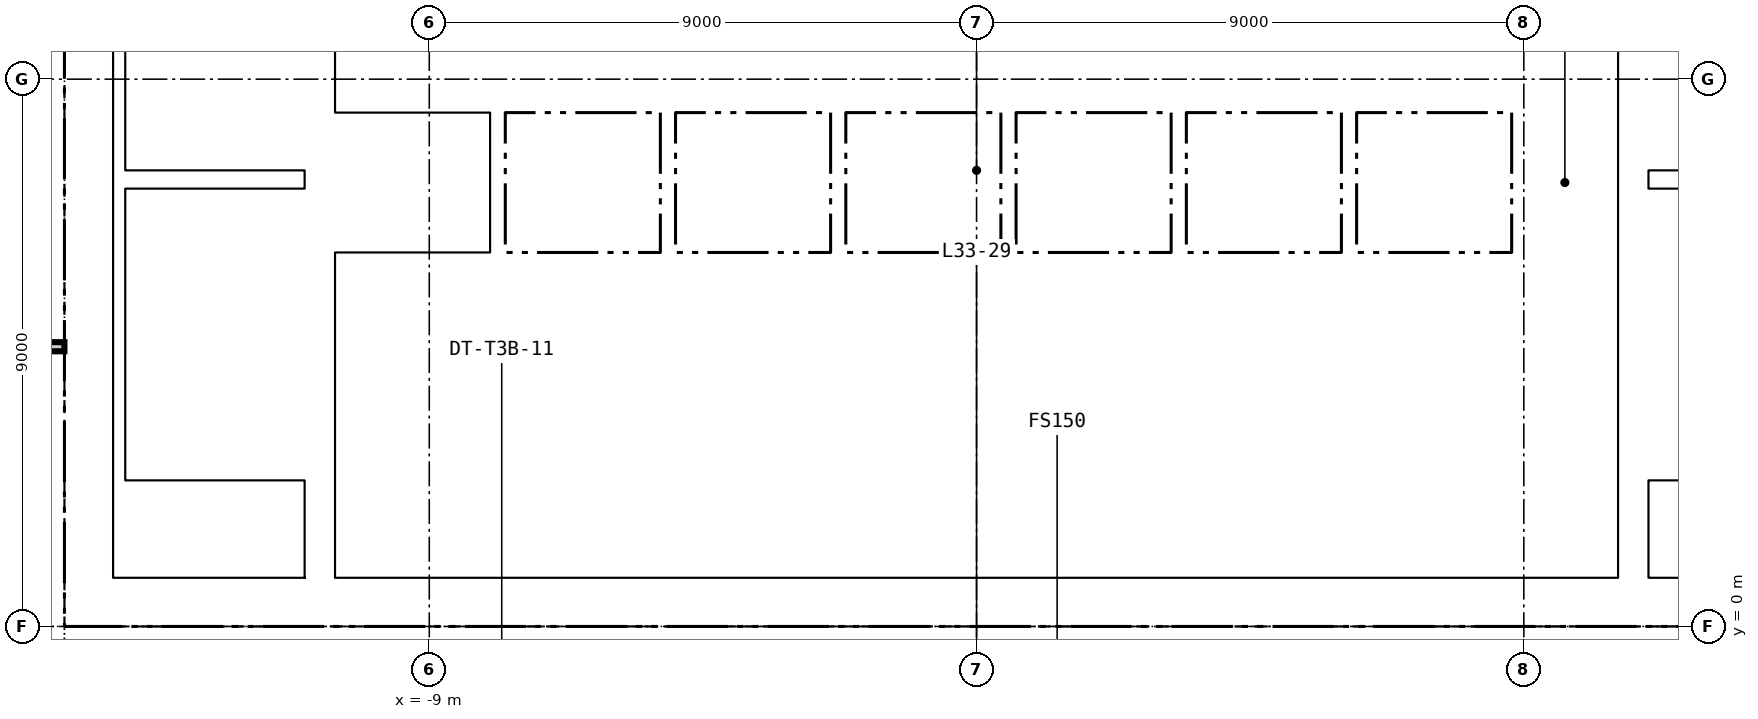
"""IFC4 building model, lengths in metres.
Left out: names, types, materials, properties, quantities, classifications, styles, units other than length and angle.
Written with IfcOpenShell. Run it as: python <this file> out.ifc"""

import sys

from ifc_helpers import new_model, si_unit, direction, frame, frame_2d, origin, place, context, subcontext, project, spatial, rectangle, extrude, element, fill, save


model = new_model("IFC4")
c1 = context("Model", 3, precision=1e-05, world=origin(), true_north=direction((0.0, 1.0)))
c2 = subcontext(c1, "Body", "Model", "MODEL_VIEW")
j1 = project(units=[si_unit("LENGTHUNIT", "METRE"), si_unit("PLANEANGLEUNIT", "RADIAN")], contexts=[c1])
p1 = place(None, origin())
s1 = spatial("IfcSite", under=j1, at=p1, CompositionType="ELEMENT")
p2 = place(p1, origin())
s2 = spatial("IfcBuilding", under=s1, at=p2, CompositionType="ELEMENT")
p3 = place(p2, frame((0.0, 0.0, 137.1)))
s3 = spatial("IfcBuildingStorey", under=s2, at=p3, CompositionType="ELEMENT", Elevation=137.1)
p4 = place(p3, frame((-15.0, 0.4, -0.15), z_axis=(0.0, 0.0, 1.0), x_axis=(1.0, 0.0, 0.0)))
e1 = element("IfcWall", 1, at=p4, inside=s3, PredefinedType="SOLIDWALL", context=c2, shape_type="SweptSolid", body=[
    extrude(rectangle(XDim=30.0, YDim=0.8, at=frame_2d((15.0, 0.0))), origin(), (0.0, 0.0, 1.0), 3.65),
])
p5 = place(p4, frame((5.8, 0.0, 0.15)))
e2 = element("IfcOpeningElement", 2, at=p5, cuts=e1, PredefinedType="OPENING", context=c2, shape_type="SweptSolid", body=[
    extrude(rectangle(XDim=2.4, YDim=2.4, at=frame_2d((1.2, 1.2))), frame((0.0, 0.41, 0.0), z_axis=(0.0, -1.0, 0.0), x_axis=(1.0, 0.0, 0.0)), (0.0, 0.0, 1.0), 0.82),
])
p6 = place(p4, frame((13.8, 0.0, 0.15)))
e3 = element("IfcOpeningElement", 3, at=p6, cuts=e1, PredefinedType="OPENING", context=c2, shape_type="SweptSolid", body=[
    extrude(rectangle(XDim=2.4, YDim=2.4, at=frame_2d((1.2, 1.2))), frame((0.0, 0.41, 0.0), z_axis=(0.0, -1.0, 0.0), x_axis=(1.0, 0.0, 0.0)), (0.0, 0.0, 1.0), 0.82),
])
p7 = place(p4, frame((21.8, 0.0, 0.15)))
e4 = element("IfcOpeningElement", 4, at=p7, cuts=e1, PredefinedType="OPENING", context=c2, shape_type="SweptSolid", body=[
    extrude(rectangle(XDim=2.4, YDim=2.4, at=frame_2d((1.2, 1.2))), frame((0.0, 0.41, 0.0), z_axis=(0.0, -1.0, 0.0), x_axis=(1.0, 0.0, 0.0)), (0.0, 0.0, 1.0), 0.82),
])
p8 = place(p4, frame((1.5, 0.0, 0.15)))
e5 = element("IfcOpeningElement", 5, at=p8, cuts=e1, PredefinedType="OPENING", context=c2, shape_type="SweptSolid", body=[
    extrude(rectangle(XDim=1.2, YDim=2.1, at=frame_2d((0.6, 1.05))), frame((0.0, 0.41, 0.0), z_axis=(0.0, -1.0, 0.0), x_axis=(1.0, 0.0, 0.0)), (0.0, 0.0, 1.0), 0.82),
])
p9 = place(p4, frame((27.3, 0.0, 0.15)))
e6 = element("IfcOpeningElement", 6, at=p9, cuts=e1, PredefinedType="OPENING", context=c2, shape_type="SweptSolid", body=[
    extrude(rectangle(XDim=1.2, YDim=2.1, at=frame_2d((0.6, 1.05))), frame((0.0, 0.41, 0.0), z_axis=(0.0, -1.0, 0.0), x_axis=(1.0, 0.0, 0.0)), (0.0, 0.0, 1.0), 0.82),
])
p10 = place(p3, frame((-14.6, 0.8, -0.15), z_axis=(0.0, 0.0, 1.0), x_axis=(0.0, 1.0, 0.0)))
e7 = element("IfcWall", 7, at=p10, inside=s3, PredefinedType="SOLIDWALL", context=c2, shape_type="SweptSolid", body=[
    extrude(rectangle(XDim=13.4, YDim=0.8, at=frame_2d((6.7, 0.0))), origin(), (0.0, 0.0, 1.0), 3.65),
])
for number, where, z_axis, x_axis in (
    (8, (-10.8, 0.8, -0.15), (0.0, 0.0, 1.0), (0.0, 1.0, 0.0)),
    (9, (10.8, 0.8, -0.15), (0.0, 0.0, 1.0), (0.0, 1.0, 0.0)),
):
    element("IfcWall", number, at=place(p3, frame(where, z_axis=z_axis, x_axis=x_axis)), inside=s3, PredefinedType="SOLIDWALL", context=c2, shape_type="SweptSolid", body=[
        extrude(rectangle(XDim=13.4, YDim=0.5, at=frame_2d((6.7, 0.0))), origin(), (0.0, 0.0, 1.0), 3.65),
    ])
p11 = place(p3, frame((-10.55, 3.5, 0.0), z_axis=(0.0, 0.0, 1.0), x_axis=(1.0, 0.0, 0.0)))
e10 = element("IfcWall", 10, at=p11, inside=s3, PredefinedType="PARTITIONING", context=c2, shape_type="SweptSolid", body=[
    extrude(rectangle(XDim=21.1, YDim=0.2, at=frame_2d((10.55, 0.0))), origin(), (0.0, 0.0, 1.0), 3.5),
])
p12 = place(p11, frame((0.663, 0.0, 0.0)))
e11 = element("IfcOpeningElement", 11, at=p12, cuts=e10, PredefinedType="OPENING", context=c2, shape_type="SweptSolid", body=[
    extrude(rectangle(XDim=1.0, YDim=2.1, at=frame_2d((0.5, 1.05))), frame((0.0, 0.11, 0.0), z_axis=(0.0, -1.0, 0.0), x_axis=(1.0, 0.0, 0.0)), (0.0, 0.0, 1.0), 0.22),
])
p13 = place(p11, frame((4.3, 0.0, 0.0)))
e12 = element("IfcOpeningElement", 12, at=p13, cuts=e10, PredefinedType="OPENING", context=c2, shape_type="SweptSolid", body=[
    extrude(rectangle(XDim=1.0, YDim=2.1, at=frame_2d((0.5, 1.05))), frame((0.0, 0.11, 0.0), z_axis=(0.0, -1.0, 0.0), x_axis=(1.0, 0.0, 0.0)), (0.0, 0.0, 1.0), 0.22),
])
p14 = place(p11, frame((9.1, 0.0, 0.0)))
e13 = element("IfcOpeningElement", 13, at=p14, cuts=e10, PredefinedType="OPENING", context=c2, shape_type="SweptSolid", body=[
    extrude(rectangle(XDim=1.0, YDim=2.1, at=frame_2d((0.5, 1.05))), frame((0.0, 0.11, 0.0), z_axis=(0.0, -1.0, 0.0), x_axis=(1.0, 0.0, 0.0)), (0.0, 0.0, 1.0), 0.22),
])
p15 = place(p11, frame((13.25, 0.0, 0.0)))
e14 = element("IfcOpeningElement", 14, at=p15, cuts=e10, PredefinedType="OPENING", context=c2, shape_type="SweptSolid", body=[
    extrude(rectangle(XDim=1.0, YDim=2.1, at=frame_2d((0.5, 1.05))), frame((0.0, 0.11, 0.0), z_axis=(0.0, -1.0, 0.0), x_axis=(1.0, 0.0, 0.0)), (0.0, 0.0, 1.0), 0.22),
])
p16 = place(p11, frame((16.962, 0.0, 0.0)))
e15 = element("IfcOpeningElement", 15, at=p16, cuts=e10, PredefinedType="OPENING", context=c2, shape_type="SweptSolid", body=[
    extrude(rectangle(XDim=1.0, YDim=2.1, at=frame_2d((0.5, 1.05))), frame((0.0, 0.11, 0.0), z_axis=(0.0, -1.0, 0.0), x_axis=(1.0, 0.0, 0.0)), (0.0, 0.0, 1.0), 0.22),
])
p17 = place(p11, frame((19.9, 0.0, 0.0)))
e16 = element("IfcOpeningElement", 16, at=p17, cuts=e10, PredefinedType="OPENING", context=c2, shape_type="SweptSolid", body=[
    extrude(rectangle(XDim=0.9, YDim=2.1, at=frame_2d((0.45, 1.05))), frame((0.0, 0.11, 0.0), z_axis=(0.0, -1.0, 0.0), x_axis=(1.0, 0.0, 0.0)), (0.0, 0.0, 1.0), 0.22),
])
p18 = place(p3, frame((-10.55, 6.025, 0.0), z_axis=(0.0, 0.0, 1.0), x_axis=(1.0, 0.0, 0.0)))
e17 = element("IfcWall", 17, at=p18, inside=s3, PredefinedType="PARTITIONING", context=c2, shape_type="SweptSolid", body=[
    extrude(rectangle(XDim=21.1, YDim=0.25, at=frame_2d((10.55, 0.0))), origin(), (0.0, 0.0, 1.0), 3.5),
])
p19 = place(p3, frame((-10.55, 8.55, 0.0), z_axis=(0.0, 0.0, 1.0), x_axis=(1.0, 0.0, 0.0)))
e18 = element("IfcWall", 18, at=p19, inside=s3, PredefinedType="PARTITIONING", context=c2, shape_type="SweptSolid", body=[
    extrude(rectangle(XDim=21.1, YDim=0.2, at=frame_2d((10.55, 0.0))), origin(), (0.0, 0.0, 1.0), 3.5),
])
p20 = place(p19, frame((0.675, 0.0, 0.0)))
e19 = element("IfcOpeningElement", 19, at=p20, cuts=e18, PredefinedType="OPENING", context=c2, shape_type="SweptSolid", body=[
    extrude(rectangle(XDim=1.2, YDim=2.1, at=frame_2d((0.6, 1.05))), frame((0.0, 0.11, 0.0), z_axis=(0.0, -1.0, 0.0), x_axis=(1.0, 0.0, 0.0)), (0.0, 0.0, 1.0), 0.22),
])
p21 = place(p19, frame((3.475, 0.0, 0.0)))
e20 = element("IfcOpeningElement", 20, at=p21, cuts=e18, PredefinedType="OPENING", context=c2, shape_type="SweptSolid", body=[
    extrude(rectangle(XDim=1.2, YDim=2.1, at=frame_2d((0.6, 1.05))), frame((0.0, 0.11, 0.0), z_axis=(0.0, -1.0, 0.0), x_axis=(1.0, 0.0, 0.0)), (0.0, 0.0, 1.0), 0.22),
])
p22 = place(p19, frame((6.275, 0.0, 0.0)))
e21 = element("IfcOpeningElement", 21, at=p22, cuts=e18, PredefinedType="OPENING", context=c2, shape_type="SweptSolid", body=[
    extrude(rectangle(XDim=1.2, YDim=2.1, at=frame_2d((0.6, 1.05))), frame((0.0, 0.11, 0.0), z_axis=(0.0, -1.0, 0.0), x_axis=(1.0, 0.0, 0.0)), (0.0, 0.0, 1.0), 0.22),
])
p23 = place(p19, frame((9.075, 0.0, 0.0)))
e22 = element("IfcOpeningElement", 22, at=p23, cuts=e18, PredefinedType="OPENING", context=c2, shape_type="SweptSolid", body=[
    extrude(rectangle(XDim=1.2, YDim=2.1, at=frame_2d((0.6, 1.05))), frame((0.0, 0.11, 0.0), z_axis=(0.0, -1.0, 0.0), x_axis=(1.0, 0.0, 0.0)), (0.0, 0.0, 1.0), 0.22),
])
p24 = place(p19, frame((11.875, 0.0, 0.0)))
e23 = element("IfcOpeningElement", 23, at=p24, cuts=e18, PredefinedType="OPENING", context=c2, shape_type="SweptSolid", body=[
    extrude(rectangle(XDim=1.2, YDim=2.1, at=frame_2d((0.6, 1.05))), frame((0.0, 0.11, 0.0), z_axis=(0.0, -1.0, 0.0), x_axis=(1.0, 0.0, 0.0)), (0.0, 0.0, 1.0), 0.22),
])
p25 = place(p19, frame((14.675, 0.0, 0.0)))
e24 = element("IfcOpeningElement", 24, at=p25, cuts=e18, PredefinedType="OPENING", context=c2, shape_type="SweptSolid", body=[
    extrude(rectangle(XDim=1.2, YDim=2.1, at=frame_2d((0.6, 1.05))), frame((0.0, 0.11, 0.0), z_axis=(0.0, -1.0, 0.0), x_axis=(1.0, 0.0, 0.0)), (0.0, 0.0, 1.0), 0.22),
])
p26 = place(p19, frame((17.475, 0.0, 0.0)))
e25 = element("IfcOpeningElement", 25, at=p26, cuts=e18, PredefinedType="OPENING", context=c2, shape_type="SweptSolid", body=[
    extrude(rectangle(XDim=1.2, YDim=2.1, at=frame_2d((0.6, 1.05))), frame((0.0, 0.11, 0.0), z_axis=(0.0, -1.0, 0.0), x_axis=(1.0, 0.0, 0.0)), (0.0, 0.0, 1.0), 0.22),
])
p27 = place(p19, frame((19.9, 0.0, 0.0)))
e26 = element("IfcOpeningElement", 26, at=p27, cuts=e18, PredefinedType="OPENING", context=c2, shape_type="SweptSolid", body=[
    extrude(rectangle(XDim=0.9, YDim=2.1, at=frame_2d((0.45, 1.05))), frame((0.0, 0.11, 0.0), z_axis=(0.0, -1.0, 0.0), x_axis=(1.0, 0.0, 0.0)), (0.0, 0.0, 1.0), 0.22),
])
p28 = place(p3, frame((-4.125, 8.65, 0.0), z_axis=(0.0, 0.0, 1.0), x_axis=(0.0, 1.0, 0.0)))
e27 = element("IfcWall", 27, at=p28, inside=s3, PredefinedType="PARTITIONING", context=c2, shape_type="SweptSolid", body=[
    extrude(rectangle(XDim=2.45, YDim=0.25, at=frame_2d((1.225, 0.0))), origin(), (0.0, 0.0, 1.0), 3.5),
])
p29 = place(p28, frame((0.625, 0.0, 0.0)))
e28 = element("IfcOpeningElement", 28, at=p29, cuts=e27, PredefinedType="OPENING", context=c2, shape_type="SweptSolid", body=[
    extrude(rectangle(XDim=1.2, YDim=2.1, at=frame_2d((0.6, 1.05))), frame((0.0, 0.135, 0.0), z_axis=(0.0, -1.0, 0.0), x_axis=(1.0, 0.0, 0.0)), (0.0, 0.0, 1.0), 0.27),
])
for number, where, z_axis, x_axis in (
    (29, (-8.15, 3.6, 0.0), (0.0, 0.0, 1.0), (0.0, 1.0, 0.0)),
    (30, (-3.35, 3.6, 0.0), (0.0, 0.0, 1.0), (0.0, 1.0, 0.0)),
    (31, (1.45, 3.6, 0.0), (0.0, 0.0, 1.0), (0.0, 1.0, 0.0)),
    (32, (4.95, 3.6, 0.0), (0.0, 0.0, 1.0), (0.0, 1.0, 0.0)),
):
    element("IfcWall", number, at=place(p3, frame(where, z_axis=z_axis, x_axis=x_axis)), inside=s3, PredefinedType="PARTITIONING", context=c2, shape_type="SweptSolid", body=[
        extrude(rectangle(XDim=2.3, YDim=0.15, at=frame_2d((1.15, 0.0))), origin(), (0.0, 0.0, 1.0), 3.5),
    ])
p30 = place(p3, frame((8.925, 3.6, 0.0), z_axis=(0.0, 0.0, 1.0), x_axis=(0.0, 1.0, 0.0)))
e33 = element("IfcWall", 33, at=p30, inside=s3, PredefinedType="PARTITIONING", context=c2, shape_type="SweptSolid", body=[
    extrude(rectangle(XDim=2.3, YDim=0.25, at=frame_2d((1.15, 0.0))), origin(), (0.0, 0.0, 1.0), 3.5),
])
for number, where, z_axis, x_axis in (
    (34, (-7.875, 6.15, 0.0), (0.0, 0.0, 1.0), (0.0, 1.0, 0.0)),
    (35, (-5.075, 6.15, 0.0), (0.0, 0.0, 1.0), (0.0, 1.0, 0.0)),
    (36, (-2.275, 6.15, 0.0), (0.0, 0.0, 1.0), (0.0, 1.0, 0.0)),
    (37, (0.525, 6.15, 0.0), (0.0, 0.0, 1.0), (0.0, 1.0, 0.0)),
    (38, (3.325, 6.15, 0.0), (0.0, 0.0, 1.0), (0.0, 1.0, 0.0)),
    (39, (6.125, 6.15, 0.0), (0.0, 0.0, 1.0), (0.0, 1.0, 0.0)),
    (40, (8.925, 6.15, 0.0), (0.0, 0.0, 1.0), (0.0, 1.0, 0.0)),
):
    element("IfcWall", number, at=place(p3, frame(where, z_axis=z_axis, x_axis=x_axis)), inside=s3, PredefinedType="PARTITIONING", context=c2, shape_type="SweptSolid", body=[
        extrude(rectangle(XDim=2.3, YDim=0.25, at=frame_2d((1.15, 0.0))), origin(), (0.0, 0.0, 1.0), 3.5),
    ])
p31 = place(p3, frame((-14.0, 7.35, 0.0), z_axis=(0.0, 0.0, 1.0), x_axis=(1.0, 0.0, 0.0)))
e41 = element("IfcWall", 41, at=p31, inside=s3, PredefinedType="SOLIDWALL", context=c2, shape_type="SweptSolid", body=[
    extrude(rectangle(XDim=2.95, YDim=0.3, at=frame_2d((1.475, 0.0))), origin(), (0.0, 0.0, 1.0), 3.5),
])
p32 = place(p3, frame((-14.1, 0.8, 0.0), z_axis=(0.0, 0.0, 1.0), x_axis=(0.0, 1.0, 0.0)))
e42 = element("IfcWall", 42, at=p32, inside=s3, PredefinedType="SOLIDWALL", context=c2, shape_type="SweptSolid", body=[
    extrude(rectangle(XDim=13.4, YDim=0.2, at=frame_2d((6.7, 0.0))), origin(), (0.0, 0.0, 1.0), 3.5),
])
p33 = place(p3, frame((11.05, 7.35, 0.0), z_axis=(0.0, 0.0, 1.0), x_axis=(1.0, 0.0, 0.0)))
e43 = element("IfcWall", 43, at=p33, inside=s3, PredefinedType="SOLIDWALL", context=c2, shape_type="SweptSolid", body=[
    extrude(rectangle(XDim=2.95, YDim=0.3, at=frame_2d((1.475, 0.0))), origin(), (0.0, 0.0, 1.0), 3.5),
])
p34 = place(p3, frame((-18.533, 4.6, 0.0), z_axis=(0.0, 0.0, 1.0), x_axis=(1.0, 0.0, 0.0)))
e44 = element("IfcWall", 44, at=p34, inside=s3, PredefinedType="PARTITIONING", context=c2, shape_type="SweptSolid", body=[
    extrude(rectangle(XDim=3.533, YDim=0.15, at=frame_2d((1.767, 0.0))), origin(), (0.0, 0.0, 1.0), 2.741),
])
p35 = place(p29, origin())
e45 = element("IfcDoor", 45, at=p35, inside=s3, OperationType="SINGLE_SWING_LEFT", PredefinedType="DOOR", context=c2, shape_type="SweptSolid", body=[
    extrude(rectangle(XDim=1.2, YDim=2.1, at=frame_2d((0.6, 1.05))), frame((0.0, 0.025, 0.0), z_axis=(0.0, -1.0, 0.0), x_axis=(1.0, 0.0, 0.0)), (0.0, 0.0, 1.0), 0.05),
])
fill(e28, e45)
p36 = place(p12, origin())
e46 = element("IfcDoor", 46, at=p36, inside=s3, OperationType="SINGLE_SWING_LEFT", PredefinedType="DOOR", context=c2, shape_type="SweptSolid", body=[
    extrude(rectangle(XDim=1.0, YDim=2.1, at=frame_2d((0.5, 1.05))), frame((0.0, 0.025, 0.0), z_axis=(0.0, -1.0, 0.0), x_axis=(1.0, 0.0, 0.0)), (0.0, 0.0, 1.0), 0.05),
])
fill(e11, e46)
p37 = place(p13, origin())
e47 = element("IfcDoor", 47, at=p37, inside=s3, OperationType="SINGLE_SWING_RIGHT", PredefinedType="DOOR", context=c2, shape_type="SweptSolid", body=[
    extrude(rectangle(XDim=1.0, YDim=2.1, at=frame_2d((0.5, 1.05))), frame((0.0, 0.025, 0.0), z_axis=(0.0, -1.0, 0.0), x_axis=(1.0, 0.0, 0.0)), (0.0, 0.0, 1.0), 0.05),
])
fill(e12, e47)
p38 = place(p14, origin())
e48 = element("IfcDoor", 48, at=p38, inside=s3, OperationType="SINGLE_SWING_LEFT", PredefinedType="DOOR", context=c2, shape_type="SweptSolid", body=[
    extrude(rectangle(XDim=1.0, YDim=2.1, at=frame_2d((0.5, 1.05))), frame((0.0, 0.025, 0.0), z_axis=(0.0, -1.0, 0.0), x_axis=(1.0, 0.0, 0.0)), (0.0, 0.0, 1.0), 0.05),
])
fill(e13, e48)
p39 = place(p15, origin())
e49 = element("IfcDoor", 49, at=p39, inside=s3, OperationType="SINGLE_SWING_RIGHT", PredefinedType="DOOR", context=c2, shape_type="SweptSolid", body=[
    extrude(rectangle(XDim=1.0, YDim=2.1, at=frame_2d((0.5, 1.05))), frame((0.0, 0.025, 0.0), z_axis=(0.0, -1.0, 0.0), x_axis=(1.0, 0.0, 0.0)), (0.0, 0.0, 1.0), 0.05),
])
fill(e14, e49)
p40 = place(p16, origin())
e50 = element("IfcDoor", 50, at=p40, inside=s3, OperationType="SINGLE_SWING_LEFT", PredefinedType="DOOR", context=c2, shape_type="SweptSolid", body=[
    extrude(rectangle(XDim=1.0, YDim=2.1, at=frame_2d((0.5, 1.05))), frame((0.0, 0.025, 0.0), z_axis=(0.0, -1.0, 0.0), x_axis=(1.0, 0.0, 0.0)), (0.0, 0.0, 1.0), 0.05),
])
fill(e15, e50)
p41 = place(p17, origin())
e51 = element("IfcDoor", 51, at=p41, inside=s3, OperationType="SINGLE_SWING_RIGHT", PredefinedType="DOOR", context=c2, shape_type="SweptSolid", body=[
    extrude(rectangle(XDim=0.9, YDim=2.1, at=frame_2d((0.45, 1.05))), frame((0.0, 0.025, 0.0), z_axis=(0.0, -1.0, 0.0), x_axis=(1.0, 0.0, 0.0)), (0.0, 0.0, 1.0), 0.05),
])
fill(e16, e51)
p42 = place(p20, origin())
e52 = element("IfcDoor", 52, at=p42, inside=s3, OperationType="DOUBLE_DOOR_SLIDING", PredefinedType="DOOR", context=c2, shape_type="SweptSolid", body=[
    extrude(rectangle(XDim=1.2, YDim=2.1, at=frame_2d((0.6, 1.05))), frame((0.0, 0.025, 0.0), z_axis=(0.0, -1.0, 0.0), x_axis=(1.0, 0.0, 0.0)), (0.0, 0.0, 1.0), 0.05),
])
fill(e19, e52)
p43 = place(p21, origin())
e53 = element("IfcDoor", 53, at=p43, inside=s3, OperationType="DOUBLE_DOOR_SLIDING", PredefinedType="DOOR", context=c2, shape_type="SweptSolid", body=[
    extrude(rectangle(XDim=1.2, YDim=2.1, at=frame_2d((0.6, 1.05))), frame((0.0, 0.025, 0.0), z_axis=(0.0, -1.0, 0.0), x_axis=(1.0, 0.0, 0.0)), (0.0, 0.0, 1.0), 0.05),
])
fill(e20, e53)
p44 = place(p22, origin())
e54 = element("IfcDoor", 54, at=p44, inside=s3, OperationType="DOUBLE_DOOR_SLIDING", PredefinedType="DOOR", context=c2, shape_type="SweptSolid", body=[
    extrude(rectangle(XDim=1.2, YDim=2.1, at=frame_2d((0.6, 1.05))), frame((0.0, 0.025, 0.0), z_axis=(0.0, -1.0, 0.0), x_axis=(1.0, 0.0, 0.0)), (0.0, 0.0, 1.0), 0.05),
])
fill(e21, e54)
p45 = place(p23, origin())
e55 = element("IfcDoor", 55, at=p45, inside=s3, OperationType="DOUBLE_DOOR_SLIDING", PredefinedType="DOOR", context=c2, shape_type="SweptSolid", body=[
    extrude(rectangle(XDim=1.2, YDim=2.1, at=frame_2d((0.6, 1.05))), frame((0.0, 0.025, 0.0), z_axis=(0.0, -1.0, 0.0), x_axis=(1.0, 0.0, 0.0)), (0.0, 0.0, 1.0), 0.05),
])
fill(e22, e55)
p46 = place(p24, origin())
e56 = element("IfcDoor", 56, at=p46, inside=s3, OperationType="DOUBLE_DOOR_SLIDING", PredefinedType="DOOR", context=c2, shape_type="SweptSolid", body=[
    extrude(rectangle(XDim=1.2, YDim=2.1, at=frame_2d((0.6, 1.05))), frame((0.0, 0.025, 0.0), z_axis=(0.0, -1.0, 0.0), x_axis=(1.0, 0.0, 0.0)), (0.0, 0.0, 1.0), 0.05),
])
fill(e23, e56)
p47 = place(p25, origin())
e57 = element("IfcDoor", 57, at=p47, inside=s3, OperationType="DOUBLE_DOOR_SLIDING", PredefinedType="DOOR", context=c2, shape_type="SweptSolid", body=[
    extrude(rectangle(XDim=1.2, YDim=2.1, at=frame_2d((0.6, 1.05))), frame((0.0, 0.025, 0.0), z_axis=(0.0, -1.0, 0.0), x_axis=(1.0, 0.0, 0.0)), (0.0, 0.0, 1.0), 0.05),
])
fill(e24, e57)
p48 = place(p26, origin())
e58 = element("IfcDoor", 58, at=p48, inside=s3, OperationType="DOUBLE_DOOR_SLIDING", PredefinedType="DOOR", context=c2, shape_type="SweptSolid", body=[
    extrude(rectangle(XDim=1.2, YDim=2.1, at=frame_2d((0.6, 1.05))), frame((0.0, 0.025, 0.0), z_axis=(0.0, -1.0, 0.0), x_axis=(1.0, 0.0, 0.0)), (0.0, 0.0, 1.0), 0.05),
])
fill(e25, e58)
p49 = place(p27, origin())
e59 = element("IfcDoor", 59, at=p49, inside=s3, OperationType="SINGLE_SWING_RIGHT", PredefinedType="DOOR", context=c2, shape_type="SweptSolid", body=[
    extrude(rectangle(XDim=0.9, YDim=2.1, at=frame_2d((0.45, 1.05))), frame((0.0, 0.025, 0.0), z_axis=(0.0, -1.0, 0.0), x_axis=(1.0, 0.0, 0.0)), (0.0, 0.0, 1.0), 0.05),
])
fill(e26, e59)
p50 = place(p5, origin())
e60 = element("IfcDoor", 60, at=p50, inside=s3, OperationType="DOUBLE_DOOR_DOUBLE_SWING", PredefinedType="DOOR", context=c2, shape_type="SweptSolid", body=[
    extrude(rectangle(XDim=2.4, YDim=2.4, at=frame_2d((1.2, 1.2))), frame((0.0, 0.025, 0.0), z_axis=(0.0, -1.0, 0.0), x_axis=(1.0, 0.0, 0.0)), (0.0, 0.0, 1.0), 0.05),
])
fill(e2, e60)
p51 = place(p6, origin())
e61 = element("IfcDoor", 61, at=p51, inside=s3, OperationType="DOUBLE_DOOR_DOUBLE_SWING", PredefinedType="DOOR", context=c2, shape_type="SweptSolid", body=[
    extrude(rectangle(XDim=2.4, YDim=2.4, at=frame_2d((1.2, 1.2))), frame((0.0, 0.025, 0.0), z_axis=(0.0, -1.0, 0.0), x_axis=(1.0, 0.0, 0.0)), (0.0, 0.0, 1.0), 0.05),
])
fill(e3, e61)
p52 = place(p7, origin())
e62 = element("IfcDoor", 62, at=p52, inside=s3, OperationType="DOUBLE_DOOR_DOUBLE_SWING", PredefinedType="DOOR", context=c2, shape_type="SweptSolid", body=[
    extrude(rectangle(XDim=2.4, YDim=2.4, at=frame_2d((1.2, 1.2))), frame((0.0, 0.025, 0.0), z_axis=(0.0, -1.0, 0.0), x_axis=(1.0, 0.0, 0.0)), (0.0, 0.0, 1.0), 0.05),
])
fill(e4, e62)
p53 = place(p8, origin())
e63 = element("IfcDoor", 63, at=p53, inside=s3, OperationType="SINGLE_SWING_LEFT", PredefinedType="DOOR", context=c2, shape_type="SweptSolid", body=[
    extrude(rectangle(XDim=1.2, YDim=2.1, at=frame_2d((0.6, 1.05))), frame((0.0, 0.025, 0.0), z_axis=(0.0, -1.0, 0.0), x_axis=(1.0, 0.0, 0.0)), (0.0, 0.0, 1.0), 0.05),
])
fill(e5, e63)
save(model, sys.argv[1])
